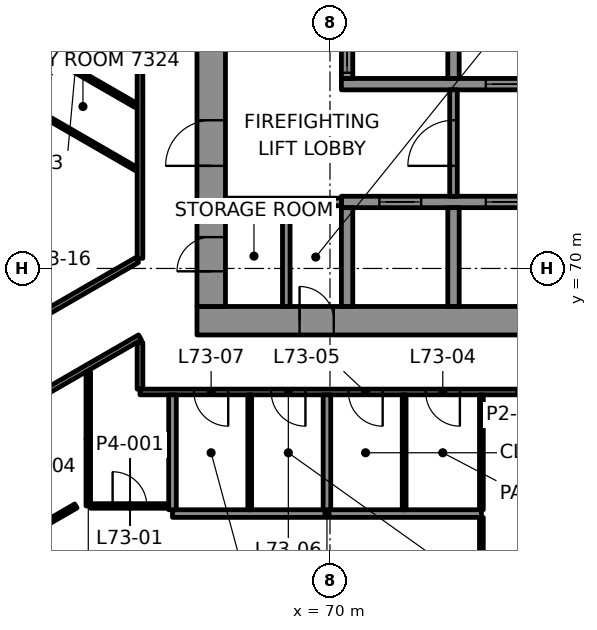
"""IFC4 building model, lengths in metres.
Left out: names, types, materials, properties, quantities, classifications, styles, units other than length and angle.
Written with IfcOpenShell. Run it as: python <this file> out.ifc"""

import sys

from ifc_helpers import new_model, si_unit, direction, frame, frame_2d, origin, place, context, subcontext, project, spatial, rectangle, extrude, element, fill, save


model = new_model("IFC4")
c1 = context("Model", 3, precision=1e-05, world=origin(), true_north=direction((0.0, 1.0)))
c2 = subcontext(c1, "Body", "Model", "MODEL_VIEW")
j1 = project(units=[si_unit("LENGTHUNIT", "METRE"), si_unit("PLANEANGLEUNIT", "RADIAN")], contexts=[c1])
p1 = place(None, origin())
s1 = spatial("IfcSite", under=j1, at=p1, CompositionType="ELEMENT")
p2 = place(p1, origin())
s2 = spatial("IfcBuilding", under=s1, at=p2, CompositionType="ELEMENT")
p3 = place(p2, frame((0.0, 0.0, 302.1)))
s3 = spatial("IfcBuildingStorey", under=s2, at=p3, CompositionType="ELEMENT", Elevation=302.1)
p4 = place(p3, frame((66.5, 68.625, 0.0), z_axis=(0.0, 0.0, 1.0), x_axis=(1.0, 0.0, 0.0)))
e1 = element("IfcWall", 1, at=p4, inside=s3, PredefinedType="SHEAR", context=c2, shape_type="SweptSolid", body=[
    extrude(rectangle(XDim=17.0, YDim=0.75, at=frame_2d((8.5, 0.0))), origin(), (0.0, 0.0, 1.0), 3.3),
])
p5 = place(p4, frame((2.7, 0.0, 0.0)))
e2 = element("IfcOpeningElement", 2, at=p5, cuts=e1, PredefinedType="OPENING", context=c2, shape_type="SweptSolid", body=[
    extrude(rectangle(XDim=0.9, YDim=2.1, at=frame_2d((0.45, 1.05))), frame((0.0, 0.385, 0.0), z_axis=(0.0, -1.0, 0.0), x_axis=(1.0, 0.0, 0.0)), (0.0, 0.0, 1.0), 0.77),
])
p6 = place(p3, frame((66.875, 69.0, 0.0), z_axis=(0.0, 0.0, 1.0), x_axis=(0.0, 1.0, 0.0)))
e3 = element("IfcWall", 3, at=p6, inside=s3, PredefinedType="SHEAR", context=c2, shape_type="SweptSolid", body=[
    extrude(rectangle(XDim=12.0, YDim=0.75, at=frame_2d((6.0, 0.0))), origin(), (0.0, 0.0, 1.0), 3.3),
])
p7 = place(p6, frame((3.7, 0.0, 0.0)))
e4 = element("IfcOpeningElement", 4, at=p7, cuts=e3, PredefinedType="OPENING", context=c2, shape_type="SweptSolid", body=[
    extrude(rectangle(XDim=1.2, YDim=2.1, at=frame_2d((0.6, 1.05))), frame((0.0, 0.385, 0.0), z_axis=(0.0, -1.0, 0.0), x_axis=(1.0, 0.0, 0.0)), (0.0, 0.0, 1.0), 0.77),
])
p8 = place(p6, frame((0.925, 0.0, 0.0)))
e5 = element("IfcOpeningElement", 5, at=p8, cuts=e3, PredefinedType="OPENING", context=c2, shape_type="SweptSolid", body=[
    extrude(rectangle(XDim=0.9, YDim=2.1, at=frame_2d((0.45, 1.05))), frame((0.0, 0.385, 0.0), z_axis=(0.0, -1.0, 0.0), x_axis=(1.0, 0.0, 0.0)), (0.0, 0.0, 1.0), 0.77),
])
p9 = place(p3, frame((70.3, 71.75, 0.0), z_axis=(0.0, 0.0, 1.0), x_axis=(1.0, 0.0, 0.0)))
e6 = element("IfcWall", 6, at=p9, inside=s3, PredefinedType="SHEAR", context=c2, shape_type="SweptSolid", body=[
    extrude(rectangle(XDim=11.5, YDim=0.3, at=frame_2d((5.75, 0.0))), origin(), (0.0, 0.0, 1.0), 3.3),
])
p10 = place(p9, frame((1.0, 0.0, 0.0)))
e7 = element("IfcOpeningElement", 7, at=p10, cuts=e6, PredefinedType="OPENING", context=c2, shape_type="SweptSolid", body=[
    extrude(rectangle(XDim=1.1, YDim=2.1, at=frame_2d((0.55, 1.05))), frame((0.0, 0.16, 0.0), z_axis=(0.0, -1.0, 0.0), x_axis=(1.0, 0.0, 0.0)), (0.0, 0.0, 1.0), 0.32),
])
p11 = place(p9, frame((3.8, 0.0, 0.0)))
e8 = element("IfcOpeningElement", 8, at=p11, cuts=e6, PredefinedType="OPENING", context=c2, shape_type="SweptSolid", body=[
    extrude(rectangle(XDim=1.1, YDim=2.1, at=frame_2d((0.55, 1.05))), frame((0.0, 0.16, 0.0), z_axis=(0.0, -1.0, 0.0), x_axis=(1.0, 0.0, 0.0)), (0.0, 0.0, 1.0), 0.32),
])
p12 = place(p9, frame((6.6, 0.0, 0.0)))
e9 = element("IfcOpeningElement", 9, at=p12, cuts=e6, PredefinedType="OPENING", context=c2, shape_type="SweptSolid", body=[
    extrude(rectangle(XDim=1.1, YDim=2.1, at=frame_2d((0.55, 1.05))), frame((0.0, 0.16, 0.0), z_axis=(0.0, -1.0, 0.0), x_axis=(1.0, 0.0, 0.0)), (0.0, 0.0, 1.0), 0.32),
])
p13 = place(p9, frame((9.4, 0.0, 0.0)))
e10 = element("IfcOpeningElement", 10, at=p13, cuts=e6, PredefinedType="OPENING", context=c2, shape_type="SweptSolid", body=[
    extrude(rectangle(XDim=1.1, YDim=2.1, at=frame_2d((0.55, 1.05))), frame((0.0, 0.16, 0.0), z_axis=(0.0, -1.0, 0.0), x_axis=(1.0, 0.0, 0.0)), (0.0, 0.0, 1.0), 0.32),
])
p14 = place(p3, frame((70.3, 74.85, 0.0), z_axis=(0.0, 0.0, 1.0), x_axis=(1.0, 0.0, 0.0)))
e11 = element("IfcWall", 11, at=p14, inside=s3, PredefinedType="SHEAR", context=c2, shape_type="SweptSolid", body=[
    extrude(rectangle(XDim=5.9, YDim=0.3, at=frame_2d((2.95, 0.0))), origin(), (0.0, 0.0, 1.0), 3.3),
])
p15 = place(p14, frame((3.8, 0.0, 0.0)))
e12 = element("IfcOpeningElement", 12, at=p15, cuts=e11, PredefinedType="OPENING", context=c2, shape_type="SweptSolid", body=[
    extrude(rectangle(XDim=1.1, YDim=2.1, at=frame_2d((0.55, 1.05))), frame((0.0, 0.16, 0.0), z_axis=(0.0, -1.0, 0.0), x_axis=(1.0, 0.0, 0.0)), (0.0, 0.0, 1.0), 0.32),
])
p16 = place(p3, frame((70.45, 69.0, 0.0), z_axis=(0.0, 0.0, 1.0), x_axis=(0.0, 1.0, 0.0)))
e13 = element("IfcWall", 13, at=p16, inside=s3, PredefinedType="SHEAR", context=c2, shape_type="SweptSolid", body=[
    extrude(rectangle(XDim=2.6, YDim=0.3, at=frame_2d((1.3, 0.0))), origin(), (0.0, 0.0, 1.0), 3.3),
])
p17 = place(p3, frame((70.45, 75.0, 0.0), z_axis=(0.0, 0.0, 1.0), x_axis=(0.0, 1.0, 0.0)))
e14 = element("IfcWall", 14, at=p17, inside=s3, PredefinedType="SHEAR", context=c2, shape_type="SweptSolid", body=[
    extrude(rectangle(XDim=2.6, YDim=0.3, at=frame_2d((1.3, 0.0))), origin(), (0.0, 0.0, 1.0), 3.3),
])
p18 = place(p17, frame((0.15, 0.0, 0.0)))
e15 = element("IfcOpeningElement", 15, at=p18, cuts=e14, PredefinedType="OPENING", context=c2, shape_type="SweptSolid", body=[
    extrude(rectangle(XDim=1.1, YDim=2.1, at=frame_2d((0.55, 1.05))), frame((0.0, 0.16, 0.0), z_axis=(0.0, -1.0, 0.0), x_axis=(1.0, 0.0, 0.0)), (0.0, 0.0, 1.0), 0.32),
])
for number, where, z_axis, x_axis in (
    (16, (73.25, 69.0, 0.0), (0.0, 0.0, 1.0), (0.0, 1.0, 0.0)),
    (17, (73.25, 75.0, 0.0), (0.0, 0.0, 1.0), (0.0, 1.0, 0.0)),
):
    element("IfcWall", number, at=place(p3, frame(where, z_axis=z_axis, x_axis=x_axis)), inside=s3, PredefinedType="SHEAR", context=c2, shape_type="SweptSolid", body=[
        extrude(rectangle(XDim=2.6, YDim=0.3, at=frame_2d((1.3, 0.0))), origin(), (0.0, 0.0, 1.0), 3.3),
    ])
p19 = place(p3, frame((65.856, 63.55, 0.0), z_axis=(0.0, 0.0, 1.0), x_axis=(1.0, 0.0, 0.0)))
e18 = element("IfcWall", 18, at=p19, inside=s3, PredefinedType="PARTITIONING", context=c2, shape_type="SweptSolid", body=[
    extrude(rectangle(XDim=8.128, YDim=0.2, at=frame_2d((4.064, 0.0))), origin(), (0.0, 0.0, 1.0), 2.7),
])
p20 = place(p3, frame((63.704, 63.75, 0.0), z_axis=(0.0, 0.0, 1.0), x_axis=(1.0, 0.0, 0.0)))
e19 = element("IfcWall", 19, at=p20, inside=s3, PredefinedType="PARTITIONING", context=c2, shape_type="SweptSolid", body=[
    extrude(rectangle(XDim=2.052, YDim=0.12, at=frame_2d((1.026, 0.0))), origin(), (0.0, 0.0, 1.0), 2.7),
])
p21 = place(p20, frame((0.576, 0.0, 0.0)))
e20 = element("IfcOpeningElement", 20, at=p21, cuts=e19, PredefinedType="OPENING", context=c2, shape_type="SweptSolid", body=[
    extrude(rectangle(XDim=0.9, YDim=2.1, at=frame_2d((0.45, 1.05))), frame((0.0, 0.07, 0.0), z_axis=(0.0, -1.0, 0.0), x_axis=(1.0, 0.0, 0.0)), (0.0, 0.0, 1.0), 0.14),
])
p22 = place(p3, frame((85.0, 66.75, 0.0), z_axis=(0.0, 0.0, 1.0), x_axis=(-1.0, 0.0, 0.0)))
e21 = element("IfcWall", 21, at=p22, inside=s3, PredefinedType="PARTITIONING", context=c2, shape_type="SweptSolid", body=[
    extrude(rectangle(XDim=20.0, YDim=0.15, at=frame_2d((10.0, 0.0))), origin(), (0.0, 0.0, 1.0), 2.7),
])
p23 = place(p22, frame((5.486, 0.0, 0.0)))
e22 = element("IfcOpeningElement", 22, at=p23, cuts=e21, PredefinedType="OPENING", context=c2, shape_type="SweptSolid", body=[
    extrude(rectangle(XDim=0.9, YDim=2.1, at=frame_2d((0.45, 1.05))), frame((0.0, 0.085, 0.0), z_axis=(0.0, -1.0, 0.0), x_axis=(1.0, 0.0, 0.0)), (0.0, 0.0, 1.0), 0.17),
])
p24 = place(p22, frame((11.582, 0.0, 0.0)))
e23 = element("IfcOpeningElement", 23, at=p24, cuts=e21, PredefinedType="OPENING", context=c2, shape_type="SweptSolid", body=[
    extrude(rectangle(XDim=0.9, YDim=2.1, at=frame_2d((0.45, 1.05))), frame((0.0, 0.085, 0.0), z_axis=(0.0, -1.0, 0.0), x_axis=(1.0, 0.0, 0.0)), (0.0, 0.0, 1.0), 0.17),
])
p25 = place(p22, frame((13.614, 0.0, 0.0)))
e24 = element("IfcOpeningElement", 24, at=p25, cuts=e21, PredefinedType="OPENING", context=c2, shape_type="SweptSolid", body=[
    extrude(rectangle(XDim=0.9, YDim=2.1, at=frame_2d((0.45, 1.05))), frame((0.0, 0.085, 0.0), z_axis=(0.0, -1.0, 0.0), x_axis=(1.0, 0.0, 0.0)), (0.0, 0.0, 1.0), 0.17),
])
p26 = place(p22, frame((15.646, 0.0, 0.0)))
e25 = element("IfcOpeningElement", 25, at=p26, cuts=e21, PredefinedType="OPENING", context=c2, shape_type="SweptSolid", body=[
    extrude(rectangle(XDim=0.9, YDim=2.1, at=frame_2d((0.45, 1.05))), frame((0.0, 0.085, 0.0), z_axis=(0.0, -1.0, 0.0), x_axis=(1.0, 0.0, 0.0)), (0.0, 0.0, 1.0), 0.17),
])
p27 = place(p22, frame((17.678, 0.0, 0.0)))
e26 = element("IfcOpeningElement", 26, at=p27, cuts=e21, PredefinedType="OPENING", context=c2, shape_type="SweptSolid", body=[
    extrude(rectangle(XDim=0.9, YDim=2.1, at=frame_2d((0.45, 1.05))), frame((0.0, 0.085, 0.0), z_axis=(0.0, -1.0, 0.0), x_axis=(1.0, 0.0, 0.0)), (0.0, 0.0, 1.0), 0.17),
])
p28 = place(p3, frame((54.16, 58.465, 0.0), z_axis=(0.0, 0.0, 1.0), x_axis=(0.866034434898, 0.499984357326, 0.0)))
e27 = element("IfcWall", 27, at=p28, inside=s3, PredefinedType="PARTITIONING", context=c2, shape_type="SweptSolid", body=[
    extrude(rectangle(XDim=10.571, YDim=0.12, at=frame_2d((5.285, 0.0))), origin(), (0.0, 0.0, 1.0), 2.7),
])
p29 = place(p28, frame((3.197, 0.0, 0.0)))
e28 = element("IfcOpeningElement", 28, at=p29, cuts=e27, PredefinedType="OPENING", context=c2, shape_type="SweptSolid", body=[
    extrude(rectangle(XDim=0.9, YDim=2.1, at=frame_2d((0.45, 1.05))), frame((0.0, 0.07, 0.0), z_axis=(0.0, -1.0, 0.0), x_axis=(1.0, 0.0, 0.0)), (0.0, 0.0, 1.0), 0.14),
])
p30 = place(p28, frame((7.97, 0.0, 0.0)))
e29 = element("IfcOpeningElement", 29, at=p30, cuts=e27, PredefinedType="OPENING", context=c2, shape_type="SweptSolid", body=[
    extrude(rectangle(XDim=0.8, YDim=2.1, at=frame_2d((0.4, 1.05))), frame((0.0, 0.07, 0.0), z_axis=(0.0, -1.0, 0.0), x_axis=(1.0, 0.0, 0.0)), (0.0, 0.0, 1.0), 0.14),
])
p31 = place(p3, frame((65.0, 68.187, 0.0), z_axis=(0.0, 0.0, 1.0), x_axis=(-0.866026430432, -0.49999822179, 0.0)))
e30 = element("IfcWall", 30, at=p31, inside=s3, PredefinedType="PARTITIONING", context=c2, shape_type="SweptSolid", body=[
    extrude(rectangle(XDim=11.648, YDim=0.15, at=frame_2d((5.824, 0.0))), origin(), (0.0, 0.0, 1.0), 2.547),
])
p32 = place(p31, frame((8.296, 0.0, 0.0)))
e31 = element("IfcOpeningElement", 31, at=p32, cuts=e30, PredefinedType="OPENING", context=c2, shape_type="SweptSolid", body=[
    extrude(rectangle(XDim=1.0, YDim=2.1, at=frame_2d((0.5, 1.05))), frame((0.0, 0.085, 0.0), z_axis=(0.0, -1.0, 0.0), x_axis=(1.0, 0.0, 0.0)), (0.0, 0.0, 1.0), 0.17),
])
p33 = place(p3, frame((54.012, 63.922, 0.0), z_axis=(0.0, 0.0, 1.0), x_axis=(0.866028779199, 0.499994153564, 0.0)))
e32 = element("IfcWall", 32, at=p33, inside=s3, PredefinedType="PARTITIONING", context=c2, shape_type="SweptSolid", body=[
    extrude(rectangle(XDim=12.601, YDim=0.15, at=frame_2d((6.3, 0.0))), origin(), (0.0, 0.0, 1.0), 2.7),
])
p34 = place(p33, frame((2.542, 0.0, 0.0)))
e33 = element("IfcOpeningElement", 33, at=p34, cuts=e32, PredefinedType="OPENING", context=c2, shape_type="SweptSolid", body=[
    extrude(rectangle(XDim=1.0, YDim=2.1, at=frame_2d((0.5, 1.05))), frame((0.0, 0.085, 0.0), z_axis=(0.0, -1.0, 0.0), x_axis=(1.0, 0.0, 0.0)), (0.0, 0.0, 1.0), 0.17),
])
p35 = place(p33, frame((8.639, 0.0, 0.0)))
e34 = element("IfcOpeningElement", 34, at=p35, cuts=e32, PredefinedType="OPENING", context=c2, shape_type="SweptSolid", body=[
    extrude(rectangle(XDim=1.0, YDim=2.1, at=frame_2d((0.5, 1.05))), frame((0.0, 0.085, 0.0), z_axis=(0.0, -1.0, 0.0), x_axis=(1.0, 0.0, 0.0)), (0.0, 0.0, 1.0), 0.17),
])
p36 = place(p3, frame((73.984, 58.465, 0.0), z_axis=(0.0, 0.0, 1.0), x_axis=(0.0, 1.0, 0.0)))
e35 = element("IfcWall", 35, at=p36, inside=s3, PredefinedType="PARTITIONING", context=c2, shape_type="SweptSolid", body=[
    extrude(rectangle(XDim=4.985, YDim=0.1, at=frame_2d((2.493, 0.0))), origin(), (0.0, 0.0, 1.0), 2.688),
])
p37 = place(p3, frame((71.952, 63.65, 0.0), z_axis=(0.0, 0.0, 1.0), x_axis=(0.0, 1.0, 0.0)))
e36 = element("IfcWall", 36, at=p37, inside=s3, PredefinedType="PARTITIONING", context=c2, shape_type="SweptSolid", body=[
    extrude(rectangle(XDim=3.025, YDim=0.1, at=frame_2d((1.513, 0.0))), origin(), (0.0, 0.0, 1.0), 2.7),
])
p38 = place(p3, frame((69.92, 63.65, 0.0), z_axis=(0.0, 0.0, 1.0), x_axis=(0.0, 1.0, 0.0)))
e37 = element("IfcWall", 37, at=p38, inside=s3, PredefinedType="PARTITIONING", context=c2, shape_type="SweptSolid", body=[
    extrude(rectangle(XDim=3.025, YDim=0.2, at=frame_2d((1.513, 0.0))), origin(), (0.0, 0.0, 1.0), 2.7),
])
p39 = place(p3, frame((67.888, 63.65, 0.0), z_axis=(0.0, 0.0, 1.0), x_axis=(0.0, 1.0, 0.0)))
e38 = element("IfcWall", 38, at=p39, inside=s3, PredefinedType="PARTITIONING", context=c2, shape_type="SweptSolid", body=[
    extrude(rectangle(XDim=3.025, YDim=0.1, at=frame_2d((1.513, 0.0))), origin(), (0.0, 0.0, 1.0), 2.7),
])
p40 = place(p3, frame((65.856, 63.65, 0.0), z_axis=(0.0, 0.0, 1.0), x_axis=(0.0, 1.0, 0.0)))
e39 = element("IfcWall", 39, at=p40, inside=s3, PredefinedType="PARTITIONING", context=c2, shape_type="SweptSolid", body=[
    extrude(rectangle(XDim=3.025, YDim=0.2, at=frame_2d((1.513, 0.0))), origin(), (0.0, 0.0, 1.0), 2.7),
])
p41 = place(p3, frame((65.0, 66.825, 0.0), z_axis=(0.0, 0.0, 1.0), x_axis=(0.0, 1.0, 0.0)))
e40 = element("IfcWall", 40, at=p41, inside=s3, PredefinedType="PARTITIONING", context=c2, shape_type="SweptSolid", body=[
    extrude(rectangle(XDim=1.226, YDim=0.15, at=frame_2d((0.613, 0.0))), origin(), (0.0, 0.0, 1.0), 2.547),
])
p42 = place(p3, frame((65.0, 70.266, 0.0), z_axis=(0.0, 0.0, 1.0), x_axis=(0.0, 1.0, 0.0)))
e41 = element("IfcWall", 41, at=p42, inside=s3, PredefinedType="PARTITIONING", context=c2, shape_type="SweptSolid", body=[
    extrude(rectangle(XDim=12.984, YDim=0.15, at=frame_2d((6.492, 0.0))), origin(), (0.0, 0.0, 1.0), 2.7),
])
p43 = place(p3, frame((63.64, 63.75, 0.0), z_axis=(0.0, 0.0, 1.0), x_axis=(0.0, 1.0, 0.0)))
e42 = element("IfcWall", 42, at=p43, inside=s3, PredefinedType="PARTITIONING", context=c2, shape_type="SweptSolid", body=[
    extrude(rectangle(XDim=3.525, YDim=0.12, at=frame_2d((1.763, 0.0))), origin(), (0.0, 0.0, 1.0), 2.547),
])
p44 = place(p3, frame((64.89, 74.293, 0.0), z_axis=(0.0, 0.0, 1.0), x_axis=(-0.866033195618, 0.499986503906, 0.0)))
e43 = element("IfcWall", 43, at=p44, inside=s3, PredefinedType="PARTITIONING", context=c2, shape_type="SweptSolid", body=[
    extrude(rectangle(XDim=3.228, YDim=0.12, at=frame_2d((1.614, 0.0))), origin(), (0.0, 0.0, 1.0), 2.7),
])
p45 = place(p3, frame((64.899, 72.62, 0.0), z_axis=(0.0, 0.0, 1.0), x_axis=(-0.866032610133, 0.499987518031, 0.0)))
e44 = element("IfcWall", 44, at=p45, inside=s3, PredefinedType="PARTITIONING", context=c2, shape_type="SweptSolid", body=[
    extrude(rectangle(XDim=3.295, YDim=0.1, at=frame_2d((1.648, 0.0))), origin(), (0.0, 0.0, 1.0), 2.7),
])
p46 = place(p3, frame((73.984, 63.65, 0.0), z_axis=(0.0, 0.0, 1.0), x_axis=(0.0, 1.0, 0.0)))
e45 = element("IfcWall", 45, at=p46, inside=s3, PredefinedType="PARTITIONING", context=c2, shape_type="SweptSolid", body=[
    extrude(rectangle(XDim=3.025, YDim=0.1, at=frame_2d((1.513, 0.0))), origin(), (0.0, 0.0, 1.0), 2.7),
])
p47 = place(p3, frame((67.25, 71.75, 0.0), z_axis=(0.0, 0.0, 1.0), x_axis=(1.0, 0.0, 0.0)))
e46 = element("IfcWall", 46, at=p47, inside=s3, PredefinedType="PARTITIONING", context=c2, shape_type="SweptSolid", body=[
    extrude(rectangle(XDim=3.05, YDim=0.2, at=frame_2d((1.525, 0.0))), origin(), (0.0, 0.0, 1.0), 3.3),
])
p48 = place(p3, frame((68.85, 69.0, 0.0), z_axis=(0.0, 0.0, 1.0), x_axis=(0.0, 1.0, 0.0)))
e47 = element("IfcWall", 47, at=p48, inside=s3, PredefinedType="PARTITIONING", context=c2, shape_type="SweptSolid", body=[
    extrude(rectangle(XDim=2.65, YDim=0.2, at=frame_2d((1.325, 0.0))), origin(), (0.0, 0.0, 1.0), 3.3),
])
p49 = place(p3, frame((73.25, 71.9, 0.0), z_axis=(0.0, 0.0, 1.0), x_axis=(0.0, 1.0, 0.0)))
e48 = element("IfcWall", 48, at=p49, inside=s3, PredefinedType="PARTITIONING", context=c2, shape_type="SweptSolid", body=[
    extrude(rectangle(XDim=2.8, YDim=0.2, at=frame_2d((1.4, 0.0))), origin(), (0.0, 0.0, 1.0), 3.3),
])
p50 = place(p49, frame((0.8, 0.0, 0.0)))
e49 = element("IfcOpeningElement", 49, at=p50, cuts=e48, PredefinedType="OPENING", context=c2, shape_type="SweptSolid", body=[
    extrude(rectangle(XDim=1.2, YDim=2.1, at=frame_2d((0.6, 1.05))), frame((0.0, 0.11, 0.0), z_axis=(0.0, -1.0, 0.0), x_axis=(1.0, 0.0, 0.0)), (0.0, 0.0, 1.0), 0.22),
])
p51 = place(p21, origin())
e50 = element("IfcDoor", 50, at=p51, inside=s3, OperationType="SINGLE_SWING_LEFT", PredefinedType="DOOR", context=c2, shape_type="SweptSolid", body=[
    extrude(rectangle(XDim=0.9, YDim=2.1, at=frame_2d((0.45, 1.05))), frame((0.0, 0.025, 0.0), z_axis=(0.0, -1.0, 0.0), x_axis=(1.0, 0.0, 0.0)), (0.0, 0.0, 1.0), 0.05),
])
fill(e20, e50)
p52 = place(p24, origin())
e51 = element("IfcDoor", 51, at=p52, inside=s3, OperationType="SINGLE_SWING_LEFT", PredefinedType="DOOR", context=c2, shape_type="SweptSolid", body=[
    extrude(rectangle(XDim=0.9, YDim=2.1, at=frame_2d((0.45, 1.05))), frame((0.0, 0.025, 0.0), z_axis=(0.0, -1.0, 0.0), x_axis=(1.0, 0.0, 0.0)), (0.0, 0.0, 1.0), 0.05),
])
fill(e23, e51)
p53 = place(p25, origin())
e52 = element("IfcDoor", 52, at=p53, inside=s3, OperationType="SINGLE_SWING_RIGHT", PredefinedType="DOOR", context=c2, shape_type="SweptSolid", body=[
    extrude(rectangle(XDim=0.9, YDim=2.1, at=frame_2d((0.45, 1.05))), frame((0.0, 0.025, 0.0), z_axis=(0.0, -1.0, 0.0), x_axis=(1.0, 0.0, 0.0)), (0.0, 0.0, 1.0), 0.05),
])
fill(e24, e52)
p54 = place(p26, origin())
e53 = element("IfcDoor", 53, at=p54, inside=s3, OperationType="SINGLE_SWING_LEFT", PredefinedType="DOOR", context=c2, shape_type="SweptSolid", body=[
    extrude(rectangle(XDim=0.9, YDim=2.1, at=frame_2d((0.45, 1.05))), frame((0.0, 0.025, 0.0), z_axis=(0.0, -1.0, 0.0), x_axis=(1.0, 0.0, 0.0)), (0.0, 0.0, 1.0), 0.05),
])
fill(e25, e53)
p55 = place(p27, origin())
e54 = element("IfcDoor", 54, at=p55, inside=s3, OperationType="SINGLE_SWING_RIGHT", PredefinedType="DOOR", context=c2, shape_type="SweptSolid", body=[
    extrude(rectangle(XDim=0.9, YDim=2.1, at=frame_2d((0.45, 1.05))), frame((0.0, 0.025, 0.0), z_axis=(0.0, -1.0, 0.0), x_axis=(1.0, 0.0, 0.0)), (0.0, 0.0, 1.0), 0.05),
])
fill(e26, e54)
p56 = place(p10, origin())
e55 = element("IfcDoor", 55, at=p56, inside=s3, OperationType="DOUBLE_DOOR_SLIDING", PredefinedType="DOOR", context=c2, shape_type="SweptSolid", body=[
    extrude(rectangle(XDim=1.1, YDim=2.1, at=frame_2d((0.55, 1.05))), frame((0.0, 0.025, 0.0), z_axis=(0.0, -1.0, 0.0), x_axis=(1.0, 0.0, 0.0)), (0.0, 0.0, 1.0), 0.05),
])
fill(e7, e55)
p57 = place(p11, origin())
e56 = element("IfcDoor", 56, at=p57, inside=s3, OperationType="DOUBLE_DOOR_SLIDING", PredefinedType="DOOR", context=c2, shape_type="SweptSolid", body=[
    extrude(rectangle(XDim=1.1, YDim=2.1, at=frame_2d((0.55, 1.05))), frame((0.0, 0.025, 0.0), z_axis=(0.0, -1.0, 0.0), x_axis=(1.0, 0.0, 0.0)), (0.0, 0.0, 1.0), 0.05),
])
fill(e8, e56)
p58 = place(p18, origin())
e57 = element("IfcDoor", 57, at=p58, inside=s3, OperationType="DOUBLE_DOOR_SLIDING", PredefinedType="DOOR", context=c2, shape_type="SweptSolid", body=[
    extrude(rectangle(XDim=1.1, YDim=2.1, at=frame_2d((0.55, 1.05))), frame((0.0, 0.025, 0.0), z_axis=(0.0, -1.0, 0.0), x_axis=(1.0, 0.0, 0.0)), (0.0, 0.0, 1.0), 0.05),
])
fill(e15, e57)
p59 = place(p15, origin())
e58 = element("IfcDoor", 58, at=p59, inside=s3, OperationType="DOUBLE_DOOR_SLIDING", PredefinedType="DOOR", context=c2, shape_type="SweptSolid", body=[
    extrude(rectangle(XDim=1.1, YDim=2.1, at=frame_2d((0.55, 1.05))), frame((0.0, 0.025, 0.0), z_axis=(0.0, -1.0, 0.0), x_axis=(1.0, 0.0, 0.0)), (0.0, 0.0, 1.0), 0.05),
])
fill(e12, e58)
p60 = place(p50, origin())
e59 = element("IfcDoor", 59, at=p60, inside=s3, OperationType="SINGLE_SWING_LEFT", PredefinedType="DOOR", context=c2, shape_type="SweptSolid", body=[
    extrude(rectangle(XDim=1.2, YDim=2.1, at=frame_2d((0.6, 1.05))), frame((0.0, 0.025, 0.0), z_axis=(0.0, -1.0, 0.0), x_axis=(1.0, 0.0, 0.0)), (0.0, 0.0, 1.0), 0.05),
])
fill(e49, e59)
p61 = place(p7, origin())
e60 = element("IfcDoor", 60, at=p61, inside=s3, OperationType="SINGLE_SWING_RIGHT", PredefinedType="DOOR", context=c2, shape_type="SweptSolid", body=[
    extrude(rectangle(XDim=1.2, YDim=2.1, at=frame_2d((0.6, 1.05))), frame((0.0, 0.095, 0.0), z_axis=(0.0, -1.0, 0.0), x_axis=(1.0, 0.0, 0.0)), (0.0, 0.0, 1.0), 0.19),
])
fill(e4, e60)
p62 = place(p8, origin())
e61 = element("IfcDoor", 61, at=p62, inside=s3, OperationType="SINGLE_SWING_RIGHT", PredefinedType="DOOR", context=c2, shape_type="SweptSolid", body=[
    extrude(rectangle(XDim=0.9, YDim=2.1, at=frame_2d((0.45, 1.05))), frame((0.0, 0.095, 0.0), z_axis=(0.0, -1.0, 0.0), x_axis=(1.0, 0.0, 0.0)), (0.0, 0.0, 1.0), 0.19),
])
fill(e5, e61)
p63 = place(p5, origin())
e62 = element("IfcDoor", 62, at=p63, inside=s3, OperationType="SINGLE_SWING_LEFT", PredefinedType="DOOR", context=c2, shape_type="SweptSolid", body=[
    extrude(rectangle(XDim=0.9, YDim=2.1, at=frame_2d((0.45, 1.05))), frame((0.0, 0.095, 0.0), z_axis=(0.0, -1.0, 0.0), x_axis=(1.0, 0.0, 0.0)), (0.0, 0.0, 1.0), 0.19),
])
fill(e2, e62)
save(model, sys.argv[1])
